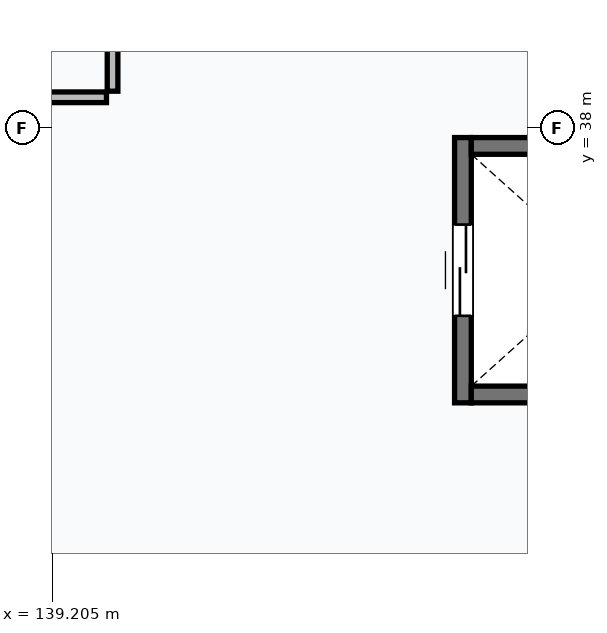
"""IFC4 building model, lengths in metres.
Left out: names, types, materials, properties, quantities, classifications, styles, units other than length and angle.
Written with IfcOpenShell. Run it as: python <this file> out.ifc"""

import sys

from ifc_helpers import new_model, si_unit, direction, frame, frame_2d, origin, place, context, subcontext, project, spatial, rectangle, extrude, element, fill, save


model = new_model("IFC4")
c1 = context("Model", 3, precision=1e-05, world=origin(), true_north=direction((0.0, 1.0)))
c2 = subcontext(c1, "Body", "Model", "MODEL_VIEW")
j1 = project(units=[si_unit("LENGTHUNIT", "METRE"), si_unit("PLANEANGLEUNIT", "RADIAN")], contexts=[c1])
p1 = place(None, origin())
s1 = spatial("IfcSite", under=j1, at=p1, CompositionType="ELEMENT")
p2 = place(p1, origin())
s2 = spatial("IfcBuilding", under=s1, at=p2, CompositionType="ELEMENT")
p3 = place(p2, frame((0.0, 0.0, 19.2)))
s3 = spatial("IfcBuildingStorey", under=s2, at=p3, CompositionType="ELEMENT", Elevation=19.2)
p4 = place(p3, frame((144.61, 34.38, 0.0), z_axis=(0.0, 0.0, 1.0), x_axis=(0.0, 1.0, 0.0)))
e1 = element("IfcWall", 1, at=p4, inside=s3, PredefinedType="SHEAR", context=c2, shape_type="SweptSolid", body=[
    extrude(rectangle(XDim=3.49, YDim=0.22, at=frame_2d((1.745, 0.0))), origin(), (0.0, 0.0, 1.0), 3.6),
])
p5 = place(p4, frame((1.145, 0.0, 0.0)))
e2 = element("IfcOpeningElement", 2, at=p5, cuts=e1, PredefinedType="OPENING", context=c2, shape_type="SweptSolid", body=[
    extrude(rectangle(XDim=1.2, YDim=2.2, at=frame_2d((0.6, 1.1))), frame((0.0, 0.12, 0.0), z_axis=(0.0, -1.0, 0.0), x_axis=(1.0, 0.0, 0.0)), (0.0, 0.0, 1.0), 0.24),
])
for number, where, z_axis, x_axis in (
    (3, (148.12, 34.49, 0.0), (0.0, 0.0, 1.0), (-1.0, 0.0, 0.0)),
    (4, (144.72, 37.76, 0.0), (0.0, 0.0, 1.0), (1.0, 0.0, 0.0)),
):
    element("IfcWall", number, at=place(p3, frame(where, z_axis=z_axis, x_axis=x_axis)), inside=s3, PredefinedType="SHEAR", context=c2, shape_type="SweptSolid", body=[
        extrude(rectangle(XDim=3.4, YDim=0.22, at=frame_2d((1.7, 0.0))), origin(), (0.0, 0.0, 1.0), 3.6),
    ])
p6 = place(p3, frame((132.08, 38.4, 0.0), z_axis=(0.0, 0.0, 1.0), x_axis=(1.0, 0.0, 0.0)))
e5 = element("IfcWall", 5, at=p6, inside=s3, PredefinedType="PARTITIONING", context=c2, shape_type="SweptSolid", body=[
    extrude(rectangle(XDim=7.84, YDim=0.14, at=frame_2d((3.92, 0.0))), origin(), (0.0, 0.0, 1.0), 3.345),
])
p7 = place(p3, frame((140.0, 38.48, 0.0), z_axis=(0.0, 0.0, 1.0), x_axis=(0.0, 1.0, 0.0)))
e6 = element("IfcWall", 6, at=p7, inside=s3, PredefinedType="PARTITIONING", context=c2, shape_type="SweptSolid", body=[
    extrude(rectangle(XDim=13.44, YDim=0.14, at=frame_2d((6.72, 0.0))), origin(), (0.0, 0.0, 1.0), 2.495),
])
p8 = place(p5, origin())
e7 = element("IfcDoor", 7, at=p8, inside=s3, OperationType="DOUBLE_DOOR_SLIDING", PredefinedType="DOOR", context=c2, shape_type="SweptSolid", body=[
    extrude(rectangle(XDim=1.2, YDim=2.2, at=frame_2d((0.6, 1.1))), frame((0.0, 0.025, 0.0), z_axis=(0.0, -1.0, 0.0), x_axis=(1.0, 0.0, 0.0)), (0.0, 0.0, 1.0), 0.05),
])
fill(e2, e7)
save(model, sys.argv[1])
